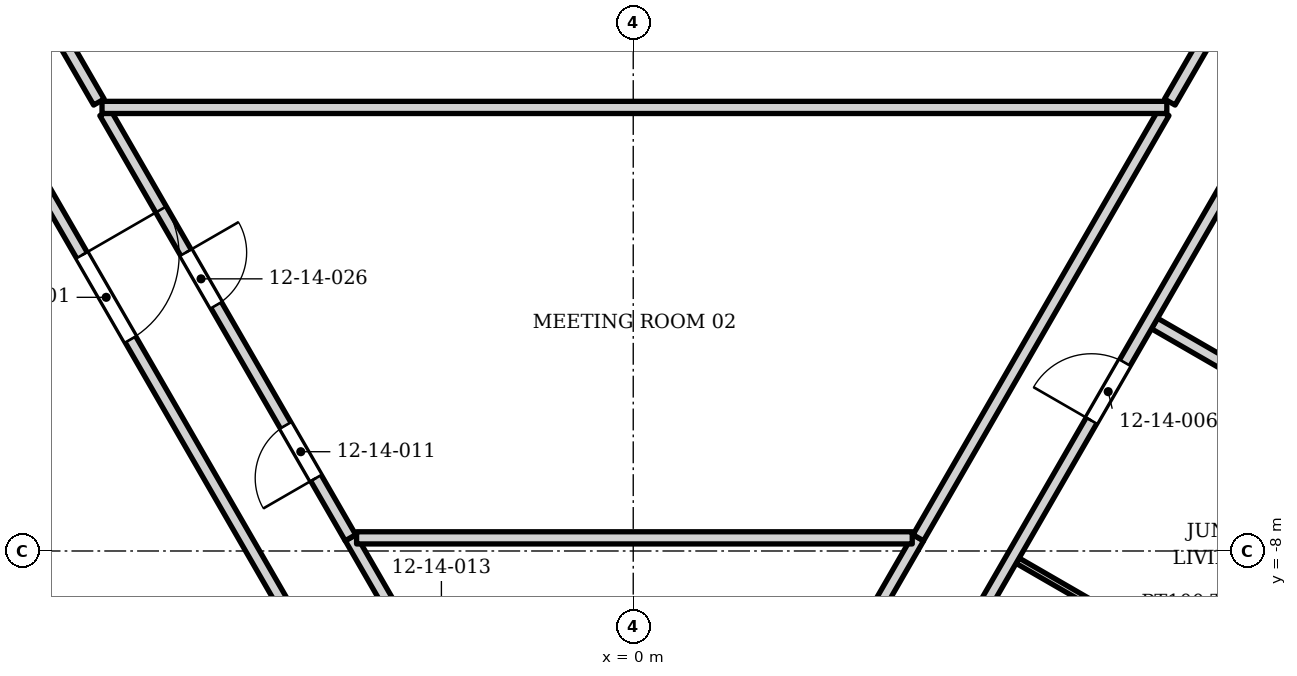
"""IFC4 building model, lengths in metres.
Left out: names, types, materials, properties, quantities, classifications, styles, units other than length and angle.
Written with IfcOpenShell. Run it as: python <this file> out.ifc"""

import sys

from ifc_helpers import new_model, si_unit, direction, frame, frame_2d, origin, place, context, subcontext, project, spatial, rectangle, extrude, element, fill, save


model = new_model("IFC4")
c1 = context("Model", 3, precision=1e-05, world=origin(), true_north=direction((0.0, 1.0)))
c2 = subcontext(c1, "Body", "Model", "MODEL_VIEW")
j1 = project(units=[si_unit("LENGTHUNIT", "METRE"), si_unit("PLANEANGLEUNIT", "RADIAN")], contexts=[c1])
p1 = place(None, origin())
s1 = spatial("IfcSite", under=j1, at=p1, CompositionType="ELEMENT")
p2 = place(p1, origin())
s2 = spatial("IfcBuilding", under=s1, at=p2, CompositionType="ELEMENT")
p3 = place(p2, frame((0.0, 0.0, 66.4)))
s3 = spatial("IfcBuildingStorey", under=s2, at=p3, CompositionType="ELEMENT", Elevation=66.4)
p4 = place(p3, frame((0.069, -15.785, 0.0), z_axis=(0.0, 0.0, 1.0), x_axis=(0.499998459685, 0.866026293084, 0.0)))
e1 = element("IfcWall", 1, at=p4, inside=s3, PredefinedType="PARTITIONING", context=c2, shape_type="SweptSolid", body=[
    extrude(rectangle(XDim=9.239, YDim=0.2, at=frame_2d((4.62, 0.0))), origin(), (0.0, 0.0, 1.0), 2.302),
])
p5 = place(p4, frame((3.663, 0.0, 0.0)))
e2 = element("IfcOpeningElement", 2, at=p5, cuts=e1, PredefinedType="OPENING", context=c2, shape_type="SweptSolid", body=[
    extrude(rectangle(XDim=1.0, YDim=2.1, at=frame_2d((0.5, 1.05))), frame((0.0, 0.11, 0.0), z_axis=(0.0, -1.0, 0.0), x_axis=(1.0, 0.0, 0.0)), (0.0, 0.0, 1.0), 0.22),
])
p6 = place(p3, frame((-12.043, 2.017, 0.0), z_axis=(0.0, 0.0, 1.0), x_axis=(0.5000018851, -0.866024315419, 0.0)))
e3 = element("IfcWall", 3, at=p6, inside=s3, PredefinedType="PARTITIONING", context=c2, shape_type="SweptSolid", body=[
    extrude(rectangle(XDim=18.0, YDim=0.2, at=frame_2d((9.0, 0.0))), origin(), (0.0, 0.0, 1.0), 2.374),
])
p7 = place(p6, frame((5.95, 0.0, 0.0)))
e4 = element("IfcOpeningElement", 4, at=p7, cuts=e3, PredefinedType="OPENING", context=c2, shape_type="SweptSolid", body=[
    extrude(rectangle(XDim=1.6, YDim=2.1, at=frame_2d((0.8, 1.05))), frame((0.0, 0.11, 0.0), z_axis=(0.0, -1.0, 0.0), x_axis=(1.0, 0.0, 0.0)), (0.0, 0.0, 1.0), 0.22),
])
p8 = place(p6, frame((14.0, 0.0, 0.0)))
e5 = element("IfcOpeningElement", 5, at=p8, cuts=e3, PredefinedType="OPENING", context=c2, shape_type="SweptSolid", body=[
    extrude(rectangle(XDim=1.1, YDim=2.1, at=frame_2d((0.55, 1.05))), frame((0.0, 0.11, 0.0), z_axis=(0.0, -1.0, 0.0), x_axis=(1.0, 0.0, 0.0)), (0.0, 0.0, 1.0), 0.22),
])
p9 = place(p3, frame((6.32, -8.158, 0.0), z_axis=(0.0, 0.0, 1.0), x_axis=(0.865995230276, -0.500052258409, 0.0)))
e6 = element("IfcWall", 6, at=p9, inside=s3, PredefinedType="PARTITIONING", context=c2, shape_type="SweptSolid", body=[
    extrude(rectangle(XDim=2.798, YDim=0.1, at=frame_2d((1.399, 0.0))), origin(), (0.0, 0.0, 1.0), 3.23),
])
p10 = place(p3, frame((-4.649, -7.782, 0.0), z_axis=(0.0, 0.0, 1.0), x_axis=(0.500018878653, -0.866014503915, 0.0)))
e7 = element("IfcWall", 7, at=p10, inside=s3, PredefinedType="PARTITIONING", context=c2, shape_type="SweptSolid", body=[
    extrude(rectangle(XDim=9.34, YDim=0.2, at=frame_2d((4.67, 0.0))), origin(), (0.0, 0.0, 1.0), 2.374),
])
p11 = place(p10, frame((2.488, 0.0, 0.0)))
e8 = element("IfcOpeningElement", 8, at=p11, cuts=e7, PredefinedType="OPENING", context=c2, shape_type="SweptSolid", body=[
    extrude(rectangle(XDim=1.0, YDim=2.1, at=frame_2d((0.5, 1.05))), frame((0.0, 0.11, 0.0), z_axis=(0.0, -1.0, 0.0), x_axis=(1.0, 0.0, 0.0)), (0.0, 0.0, 1.0), 0.22),
])
p12 = place(p3, frame((-4.55, -7.784, 0.0), z_axis=(0.0, 0.0, 1.0), x_axis=(1.0, 0.0, 0.0)))
e9 = element("IfcWall", 9, at=p12, inside=s3, PredefinedType="PARTITIONING", context=c2, shape_type="SweptSolid", body=[
    extrude(rectangle(XDim=9.138, YDim=0.2, at=frame_2d((4.569, 0.0))), origin(), (0.0, 0.0, 1.0), 2.384),
])
p13 = place(p3, frame((4.688, -7.782, 0.0), z_axis=(0.0, 0.0, 1.0), x_axis=(0.499996438971, 0.866027459735, 0.0)))
e10 = element("IfcWall", 10, at=p13, inside=s3, PredefinedType="PARTITIONING", context=c2, shape_type="SweptSolid", body=[
    extrude(rectangle(XDim=8.073, YDim=0.2, at=frame_2d((4.037, 0.0))), origin(), (0.0, 0.0, 1.0), 2.384),
])
p14 = place(p3, frame((8.572, -4.258, 0.0), z_axis=(0.0, 0.0, 1.0), x_axis=(0.865900080757, -0.500217003055, 0.0)))
e11 = element("IfcWall", 11, at=p14, inside=s3, PredefinedType="PARTITIONING", context=c2, shape_type="SweptSolid", body=[
    extrude(rectangle(XDim=7.25, YDim=0.2, at=frame_2d((3.625, 0.0))), origin(), (0.0, 0.0, 1.0), 2.384),
])
p15 = place(p3, frame((-8.686, -0.79, 0.0), z_axis=(0.0, 0.0, 1.0), x_axis=(0.499814962183, -0.866132209064, 0.0)))
e12 = element("IfcWall", 12, at=p15, inside=s3, PredefinedType="PARTITIONING", context=c2, shape_type="SweptSolid", body=[
    extrude(rectangle(XDim=8.072, YDim=0.2, at=frame_2d((4.036, 0.0))), origin(), (0.0, 0.0, 1.0), 2.384),
])
p16 = place(p15, frame((5.939, 0.0, 0.0)))
e13 = element("IfcOpeningElement", 13, at=p16, cuts=e12, PredefinedType="OPENING", context=c2, shape_type="SweptSolid", body=[
    extrude(rectangle(XDim=1.0, YDim=2.1, at=frame_2d((0.5, 1.05))), frame((0.0, 0.11, 0.0), z_axis=(0.0, -1.0, 0.0), x_axis=(1.0, 0.0, 0.0)), (0.0, 0.0, 1.0), 0.22),
])
p17 = place(p15, frame((2.657, 0.0, 0.0)))
e14 = element("IfcOpeningElement", 14, at=p17, cuts=e12, PredefinedType="OPENING", context=c2, shape_type="SweptSolid", body=[
    extrude(rectangle(XDim=1.0, YDim=2.1, at=frame_2d((0.5, 1.05))), frame((0.0, 0.11, 0.0), z_axis=(0.0, -1.0, 0.0), x_axis=(1.0, 0.0, 0.0)), (0.0, 0.0, 1.0), 0.22),
])
p18 = place(p3, frame((-8.737, -0.706, 0.0), z_axis=(0.0, 0.0, 1.0), x_axis=(1.0, 0.0, 0.0)))
e15 = element("IfcWall", 15, at=p18, inside=s3, PredefinedType="PARTITIONING", context=c2, shape_type="SweptSolid", body=[
    extrude(rectangle(XDim=17.512, YDim=0.2, at=frame_2d((8.756, 0.0))), origin(), (0.0, 0.0, 1.0), 2.384),
])
p19 = place(p3, frame((8.824, -0.617, 0.0), z_axis=(0.0, 0.0, 1.0), x_axis=(0.500271769931, 0.865868440475, 0.0)))
e16 = element("IfcWall", 16, at=p19, inside=s3, PredefinedType="PARTITIONING", context=c2, shape_type="SweptSolid", body=[
    extrude(rectangle(XDim=4.885, YDim=0.2, at=frame_2d((2.443, 0.0))), origin(), (0.0, 0.0, 1.0), 2.552),
])
p20 = place(p3, frame((2.686, -14.257, 0.0), z_axis=(0.0, 0.0, 1.0), x_axis=(0.49998850195, 0.866032042085, 0.0)))
e17 = element("IfcWall", 17, at=p20, inside=s3, PredefinedType="PARTITIONING", context=c2, shape_type="SweptSolid", body=[
    extrude(rectangle(XDim=20.6, YDim=0.2, at=frame_2d((10.3, 0.0))), origin(), (0.0, 0.0, 1.0), 2.302),
])
p21 = place(p20, frame((9.7, 0.0, 0.0)))
e18 = element("IfcOpeningElement", 18, at=p21, cuts=e17, PredefinedType="OPENING", context=c2, shape_type="SweptSolid", body=[
    extrude(rectangle(XDim=1.1, YDim=2.1, at=frame_2d((0.55, 1.05))), frame((0.0, 0.11, 0.0), z_axis=(0.0, -1.0, 0.0), x_axis=(1.0, 0.0, 0.0)), (0.0, 0.0, 1.0), 0.22),
])
p22 = place(p20, frame((15.6, 0.0, 0.0)))
e19 = element("IfcOpeningElement", 19, at=p22, cuts=e17, PredefinedType="OPENING", context=c2, shape_type="SweptSolid", body=[
    extrude(rectangle(XDim=1.0, YDim=2.1, at=frame_2d((0.5, 1.05))), frame((0.0, 0.11, 0.0), z_axis=(0.0, -1.0, 0.0), x_axis=(1.0, 0.0, 0.0)), (0.0, 0.0, 1.0), 0.22),
])
p23 = place(p3, frame((-11.23, 3.613, 0.0), z_axis=(0.0, 0.0, 1.0), x_axis=(0.49997195544, -0.866041594713, 0.0)))
e20 = element("IfcWall", 20, at=p23, inside=s3, PredefinedType="PARTITIONING", context=c2, shape_type="SweptSolid", body=[
    extrude(rectangle(XDim=4.885, YDim=0.2, at=frame_2d((2.442, 0.0))), origin(), (0.0, 0.0, 1.0), 2.552),
])
p24 = place(p7, origin())
e21 = element("IfcDoor", 21, at=p24, inside=s3, OperationType="DOUBLE_DOOR_SINGLE_SWING", PredefinedType="DOOR", context=c2, shape_type="SweptSolid", body=[
    extrude(rectangle(XDim=1.6, YDim=2.1, at=frame_2d((0.8, 1.05))), frame((0.0, 0.025, 0.0), z_axis=(0.0, -1.0, 0.0), x_axis=(1.0, 0.0, 0.0)), (0.0, 0.0, 1.0), 0.05),
])
fill(e4, e21)
p25 = place(p21, origin())
e22 = element("IfcDoor", 22, at=p25, inside=s3, OperationType="SINGLE_SWING_LEFT", PredefinedType="DOOR", context=c2, shape_type="SweptSolid", body=[
    extrude(rectangle(XDim=1.1, YDim=2.1, at=frame_2d((0.55, 1.05))), frame((0.0, 0.025, 0.0), z_axis=(0.0, -1.0, 0.0), x_axis=(1.0, 0.0, 0.0)), (0.0, 0.0, 1.0), 0.05),
])
fill(e18, e22)
p26 = place(p16, origin())
e23 = element("IfcDoor", 23, at=p26, inside=s3, OperationType="SINGLE_SWING_RIGHT", PredefinedType="DOOR", context=c2, shape_type="SweptSolid", body=[
    extrude(rectangle(XDim=1.0, YDim=2.1, at=frame_2d((0.5, 1.05))), frame((0.0, 0.025, 0.0), z_axis=(0.0, -1.0, 0.0), x_axis=(1.0, 0.0, 0.0)), (0.0, 0.0, 1.0), 0.05),
])
fill(e13, e23)
p27 = place(p17, origin())
e24 = element("IfcDoor", 24, at=p27, inside=s3, OperationType="SINGLE_SWING_LEFT", PredefinedType="DOOR", context=c2, shape_type="SweptSolid", body=[
    extrude(rectangle(XDim=1.0, YDim=2.1, at=frame_2d((0.5, 1.05))), frame((0.0, 0.025, 0.0), z_axis=(0.0, -1.0, 0.0), x_axis=(1.0, 0.0, 0.0)), (0.0, 0.0, 1.0), 0.05),
])
fill(e14, e24)
save(model, sys.argv[1])
